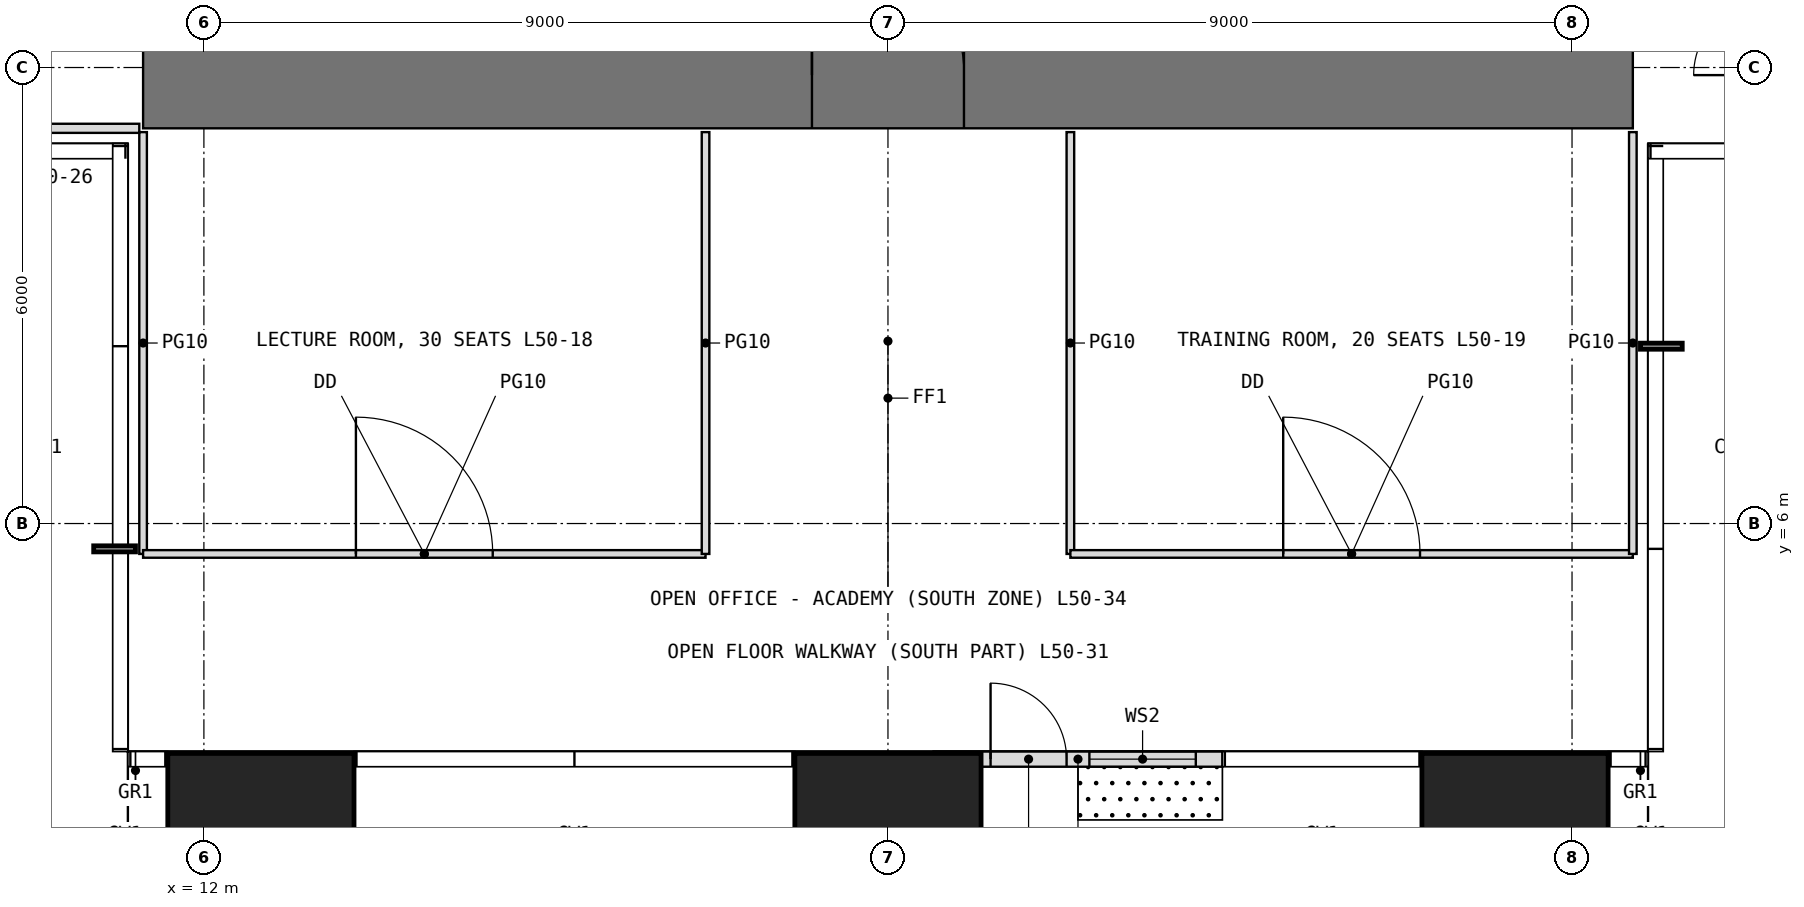
"""IFC4 building model, lengths in metres.
Left out: names, types, materials, properties, quantities, classifications, styles, units other than length and angle.
Written with IfcOpenShell. Run it as: python <this file> out.ifc"""

import sys

from ifc_helpers import new_model, si_unit, direction, frame, frame_2d, origin, origin_2d, place, context, subcontext, project, spatial, rectangle, extrude, element, fill, save


model = new_model("IFC4")
c1 = context("Model", 3, precision=1e-05, world=origin(), true_north=direction((0.0, 1.0)))
c2 = subcontext(c1, "Body", "Model", "MODEL_VIEW")
j1 = project(units=[si_unit("LENGTHUNIT", "METRE"), si_unit("PLANEANGLEUNIT", "RADIAN")], contexts=[c1])
p1 = place(None, origin())
s1 = spatial("IfcSite", under=j1, at=p1, CompositionType="ELEMENT")
p2 = place(p1, origin())
s2 = spatial("IfcBuilding", under=s1, at=p2, CompositionType="ELEMENT")
p3 = place(p2, frame((0.0, 0.0, 210.5)))
s3 = spatial("IfcBuildingStorey", under=s2, at=p3, CompositionType="ELEMENT", Elevation=210.5)
for number, where, z_axis, x_axis in (
    (1, (12.75, 1.75, 0.0), (0.0, 0.0, 1.0), (1.0, 0.0, 0.0)),
    (2, (21.0, 1.75, 0.0), (0.0, 0.0, 1.0), (1.0, 0.0, 0.0)),
    (3, (29.25, 1.75, 0.0), (0.0, 0.0, 1.0), (1.0, 0.0, 0.0)),
):
    element("IfcColumn", number, at=place(p3, frame(where, z_axis=z_axis, x_axis=x_axis)), inside=s3, PredefinedType="COLUMN", context=c2, shape_type="SweptSolid", body=[
        extrude(rectangle(XDim=2.45, YDim=2.45, at=origin_2d()), origin(), (0.0, 0.0, 1.0), 4.0),
    ])
p4 = place(p3, frame((21.6, 2.9, 0.0), z_axis=(0.0, 0.0, 1.0), x_axis=(1.0, 0.0, 0.0)))
e4 = element("IfcWall", 4, at=p4, inside=s3, PredefinedType="USERDEFINED", context=c2, shape_type="SweptSolid", body=[
    extrude(rectangle(XDim=3.8, YDim=0.2, at=frame_2d((1.9, 0.0))), origin(), (0.0, 0.0, 1.0), 3.75),
])
p5 = place(p4, frame((0.75, 0.0, 0.0)))
e5 = element("IfcOpeningElement", 5, at=p5, cuts=e4, PredefinedType="OPENING", context=c2, shape_type="SweptSolid", body=[
    extrude(rectangle(XDim=1.0, YDim=2.4, at=frame_2d((0.5, 1.2))), frame((0.0, 0.11, 0.0), z_axis=(0.0, -1.0, 0.0), x_axis=(1.0, 0.0, 0.0)), (0.0, 0.0, 1.0), 0.22),
])
p6 = place(p4, frame((2.05, 0.0, 0.3)))
e6 = element("IfcOpeningElement", 6, at=p6, cuts=e4, PredefinedType="OPENING", context=c2, shape_type="SweptSolid", body=[
    extrude(rectangle(XDim=1.4, YDim=2.7, at=frame_2d((0.7, 1.35))), frame((0.0, 0.11, 0.0), z_axis=(0.0, -1.0, 0.0), x_axis=(1.0, 0.0, 0.0)), (0.0, 0.0, 1.0), 0.22),
])
p7 = place(p3, frame((11.2, 11.9, -0.05), z_axis=(0.0, 0.0, 1.0), x_axis=(1.0, 0.0, 0.0)))
e7 = element("IfcWall", 7, at=p7, inside=s3, PredefinedType="SHEAR", context=c2, shape_type="SweptSolid", body=[
    extrude(rectangle(XDim=19.6, YDim=1.4, at=frame_2d((9.8, 0.0))), origin(), (0.0, 0.0, 1.0), 4.0),
])
p8 = place(p7, frame((8.8, 0.0, 0.05)))
e8 = element("IfcOpeningElement", 8, at=p8, cuts=e7, PredefinedType="OPENING", context=c2, shape_type="SweptSolid", body=[
    extrude(rectangle(XDim=2.0, YDim=2.2, at=frame_2d((1.0, 1.1))), frame((0.0, 0.71, 0.0), z_axis=(0.0, -1.0, 0.0), x_axis=(1.0, 0.0, 0.0)), (0.0, 0.0, 1.0), 1.42),
])
p9 = place(p3, frame((8.5, 11.2, 0.0), z_axis=(0.0, 0.0, 1.0), x_axis=(1.0, 0.0, 0.0)))
e9 = element("IfcWall", 9, at=p9, inside=s3, PredefinedType="PARTITIONING", context=c2, shape_type="SweptSolid", body=[
    extrude(rectangle(XDim=2.65, YDim=0.12, at=frame_2d((1.325, 0.0))), origin(), (0.0, 0.0, 1.0), 3.75),
])
p10 = place(p3, frame((11.2, 5.6, 0.0), z_axis=(0.0, 0.0, 1.0), x_axis=(0.0, 1.0, 0.0)))
e10 = element("IfcWall", 10, at=p10, inside=s3, PredefinedType="PARTITIONING", context=c2, shape_type="SweptSolid", body=[
    extrude(rectangle(XDim=5.55, YDim=0.1, at=frame_2d((2.775, 0.0))), origin(), (0.0, 0.0, 1.0), 3.75),
])
p11 = place(p3, frame((11.2, 5.6, 0.0), z_axis=(0.0, 0.0, 1.0), x_axis=(1.0, 0.0, 0.0)))
e11 = element("IfcWall", 11, at=p11, inside=s3, PredefinedType="PARTITIONING", context=c2, shape_type="SweptSolid", body=[
    extrude(rectangle(XDim=7.4, YDim=0.1, at=frame_2d((3.7, 0.0))), origin(), (0.0, 0.0, 1.0), 3.75),
])
p12 = place(p11, frame((2.8, 0.0, 0.0)))
e12 = element("IfcOpeningElement", 12, at=p12, cuts=e11, PredefinedType="OPENING", context=c2, shape_type="SweptSolid", body=[
    extrude(rectangle(XDim=1.8, YDim=2.4, at=frame_2d((0.9, 1.2))), frame((0.0, 0.06, 0.0), z_axis=(0.0, -1.0, 0.0), x_axis=(1.0, 0.0, 0.0)), (0.0, 0.0, 1.0), 0.12),
])
for number, where, z_axis, x_axis in (
    (13, (18.6, 5.6, 0.0), (0.0, 0.0, 1.0), (0.0, 1.0, 0.0)),
    (14, (23.4, 5.6, 0.0), (0.0, 0.0, 1.0), (0.0, 1.0, 0.0)),
):
    element("IfcWall", number, at=place(p3, frame(where, z_axis=z_axis, x_axis=x_axis)), inside=s3, PredefinedType="PARTITIONING", context=c2, shape_type="SweptSolid", body=[
        extrude(rectangle(XDim=5.55, YDim=0.1, at=frame_2d((2.775, 0.0))), origin(), (0.0, 0.0, 1.0), 3.75),
    ])
p13 = place(p3, frame((23.4, 5.6, 0.0), z_axis=(0.0, 0.0, 1.0), x_axis=(1.0, 0.0, 0.0)))
e15 = element("IfcWall", 15, at=p13, inside=s3, PredefinedType="PARTITIONING", context=c2, shape_type="SweptSolid", body=[
    extrude(rectangle(XDim=7.4, YDim=0.1, at=frame_2d((3.7, 0.0))), origin(), (0.0, 0.0, 1.0), 3.75),
])
p14 = place(p13, frame((2.8, 0.0, 0.0)))
e16 = element("IfcOpeningElement", 16, at=p14, cuts=e15, PredefinedType="OPENING", context=c2, shape_type="SweptSolid", body=[
    extrude(rectangle(XDim=1.8, YDim=2.4, at=frame_2d((0.9, 1.2))), frame((0.0, 0.06, 0.0), z_axis=(0.0, -1.0, 0.0), x_axis=(1.0, 0.0, 0.0)), (0.0, 0.0, 1.0), 0.12),
])
p15 = place(p3, frame((30.8, 5.6, 0.0), z_axis=(0.0, 0.0, 1.0), x_axis=(0.0, 1.0, 0.0)))
e17 = element("IfcWall", 17, at=p15, inside=s3, PredefinedType="PARTITIONING", context=c2, shape_type="SweptSolid", body=[
    extrude(rectangle(XDim=5.55, YDim=0.1, at=frame_2d((2.775, 0.0))), origin(), (0.0, 0.0, 1.0), 3.75),
])
p16 = place(p5, origin())
e18 = element("IfcDoor", 18, at=p16, inside=s3, OperationType="SINGLE_SWING_LEFT", PredefinedType="DOOR", context=c2, shape_type="SweptSolid", body=[
    extrude(rectangle(XDim=1.0, YDim=2.4, at=frame_2d((0.5, 1.2))), frame((0.0, 0.025, 0.0), z_axis=(0.0, -1.0, 0.0), x_axis=(1.0, 0.0, 0.0)), (0.0, 0.0, 1.0), 0.05),
])
fill(e5, e18)
p17 = place(p6, origin())
e19 = element("IfcWindow", 19, at=p17, inside=s3, PartitioningType="SINGLE_PANEL", PredefinedType="WINDOW", context=c2, shape_type="SweptSolid", body=[
    extrude(rectangle(XDim=1.4, YDim=2.7, at=frame_2d((0.7, 1.35))), frame((0.0, 0.03, 0.0), z_axis=(0.0, -1.0, 0.0), x_axis=(1.0, 0.0, 0.0)), (0.0, 0.0, 1.0), 0.06),
])
fill(e6, e19)
p18 = place(p8, origin())
e20 = element("IfcDoor", 20, at=p18, inside=s3, OperationType="DOUBLE_DOOR_SINGLE_SWING", PredefinedType="DOOR", context=c2, shape_type="SweptSolid", body=[
    extrude(rectangle(XDim=2.0, YDim=2.2, at=frame_2d((1.0, 1.1))), frame((0.0, 0.025, 0.0), z_axis=(0.0, -1.0, 0.0), x_axis=(1.0, 0.0, 0.0)), (0.0, 0.0, 1.0), 0.05),
])
fill(e8, e20)
p19 = place(p12, origin())
e21 = element("IfcDoor", 21, at=p19, inside=s3, OperationType="DOUBLE_DOOR_SINGLE_SWING", PredefinedType="DOOR", context=c2, shape_type="SweptSolid", body=[
    extrude(rectangle(XDim=1.8, YDim=2.4, at=frame_2d((0.9, 1.2))), frame((0.0, 0.025, 0.0), z_axis=(0.0, -1.0, 0.0), x_axis=(1.0, 0.0, 0.0)), (0.0, 0.0, 1.0), 0.05),
])
fill(e12, e21)
p20 = place(p14, origin())
e22 = element("IfcDoor", 22, at=p20, inside=s3, OperationType="DOUBLE_DOOR_SINGLE_SWING", PredefinedType="DOOR", context=c2, shape_type="SweptSolid", body=[
    extrude(rectangle(XDim=1.8, YDim=2.4, at=frame_2d((0.9, 1.2))), frame((0.0, 0.025, 0.0), z_axis=(0.0, -1.0, 0.0), x_axis=(1.0, 0.0, 0.0)), (0.0, 0.0, 1.0), 0.05),
])
fill(e16, e22)
save(model, sys.argv[1])
